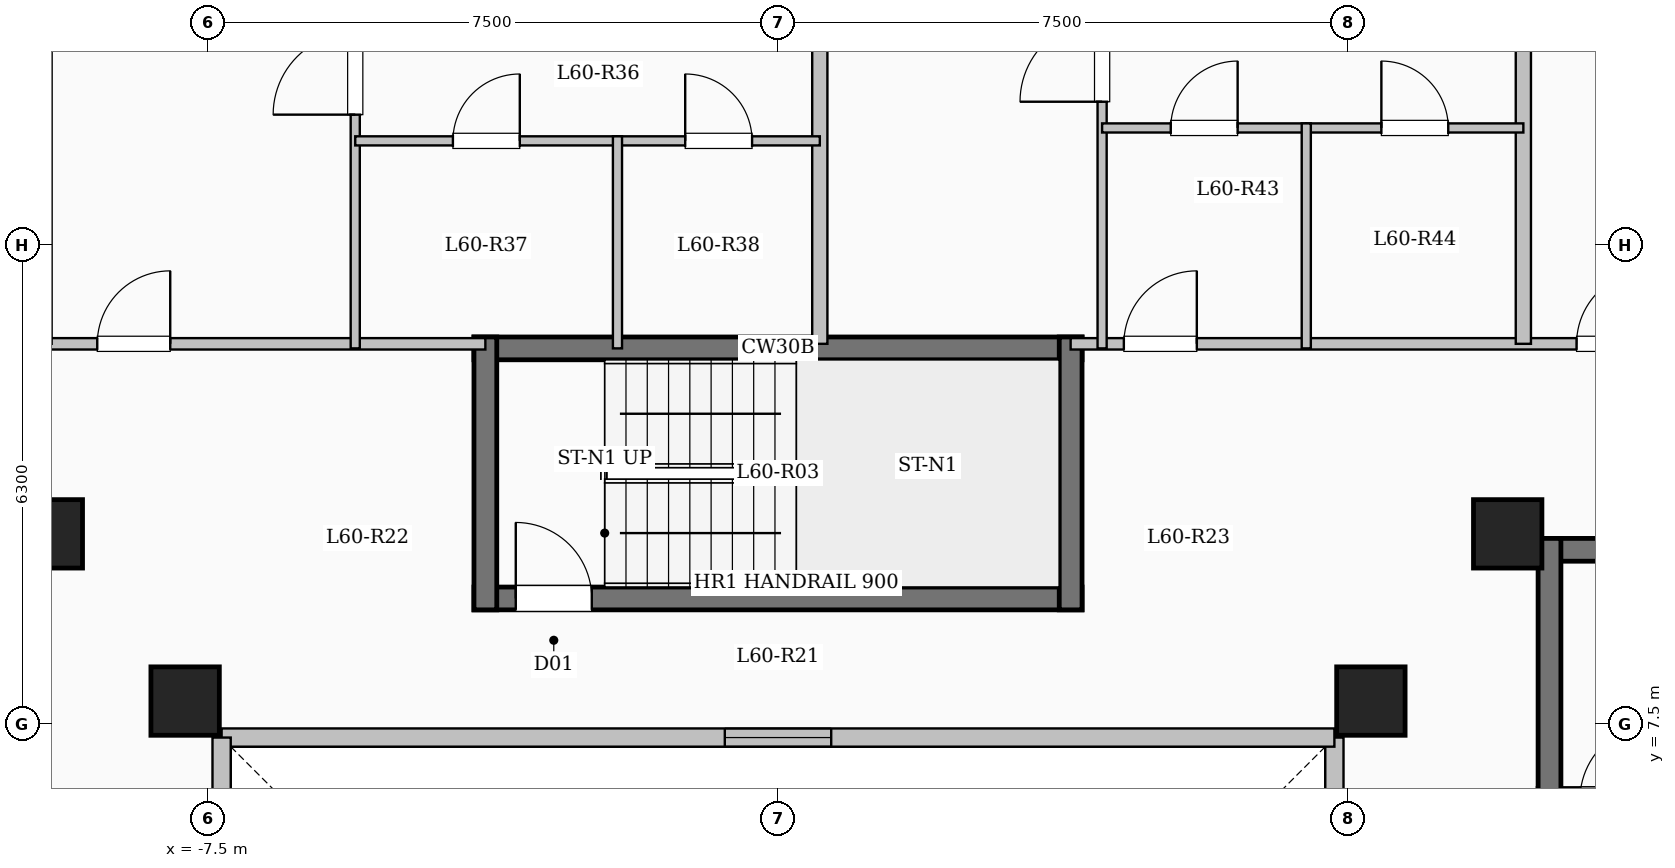
"""IFC4 building model, lengths in metres.
Left out: names, types, materials, properties, quantities, classifications, styles, units other than length and angle.
Written with IfcOpenShell. Run it as: python <this file> out.ifc"""

import sys

from ifc_helpers import new_model, si_unit, direction, frame, frame_2d, origin, origin_2d, place, context, subcontext, project, spatial, rectangle, extrude, element, fill, save


model = new_model("IFC4")
c1 = context("Model", 3, precision=1e-05, world=origin(), true_north=direction((0.0, 1.0)))
c2 = subcontext(c1, "Body", "Model", "MODEL_VIEW")
j1 = project(units=[si_unit("LENGTHUNIT", "METRE"), si_unit("PLANEANGLEUNIT", "RADIAN")], contexts=[c1])
p1 = place(None, origin())
s1 = spatial("IfcSite", under=j1, at=p1, CompositionType="ELEMENT")
p2 = place(p1, origin())
s2 = spatial("IfcBuilding", under=s1, at=p2, CompositionType="ELEMENT")
p3 = place(p2, frame((0.0, 0.0, 220.4)))
s3 = spatial("IfcBuildingStorey", under=s2, at=p3, CompositionType="ELEMENT", Elevation=220.4)
for number, where, z_axis, x_axis in (
    (1, (-7.8, 7.8, 0.0), (0.0, 0.0, 1.0), (1.0, 0.0, 0.0)),
    (2, (7.8, 7.8, 0.0), (0.0, 0.0, 1.0), (1.0, 0.0, 0.0)),
    (3, (-9.6, 10.0, 0.0), (0.0, 0.0, 1.0), (1.0, 0.0, 0.0)),
    (4, (9.6, 10.0, 0.0), (0.0, 0.0, 1.0), (1.0, 0.0, 0.0)),
):
    element("IfcColumn", number, at=place(p3, frame(where, z_axis=z_axis, x_axis=x_axis)), inside=s3, PredefinedType="COLUMN", context=c2, shape_type="SweptSolid", body=[
        extrude(rectangle(XDim=0.9, YDim=0.9, at=origin_2d()), origin(), (0.0, 0.0, 1.0), 3.35),
    ])
p4 = place(p3, frame((7.32, -7.32, 0.0), z_axis=(0.0, 0.0, 1.0), x_axis=(0.0, 1.0, 0.0)))
e5 = element("IfcWall", 5, at=p4, inside=s3, PredefinedType="SOLIDWALL", context=c2, shape_type="SweptSolid", body=[
    extrude(rectangle(XDim=14.64, YDim=0.24, at=frame_2d((7.32, 0.0))), origin(), (0.0, 0.0, 1.0), 3.1),
])
p5 = place(p4, frame((6.62, 0.0, 0.95)))
e6 = element("IfcOpeningElement", 6, at=p5, cuts=e5, PredefinedType="OPENING", context=c2, shape_type="SweptSolid", body=[
    extrude(rectangle(XDim=1.4, YDim=1.5, at=frame_2d((0.7, 0.75))), frame((0.0, 0.13, 0.0), z_axis=(0.0, -1.0, 0.0), x_axis=(1.0, 0.0, 0.0)), (0.0, 0.0, 1.0), 0.26),
])
p6 = place(p3, frame((7.32, 7.32, 0.0), z_axis=(0.0, 0.0, 1.0), x_axis=(-1.0, 0.0, 0.0)))
e7 = element("IfcWall", 7, at=p6, inside=s3, PredefinedType="SOLIDWALL", context=c2, shape_type="SweptSolid", body=[
    extrude(rectangle(XDim=14.64, YDim=0.24, at=frame_2d((7.32, 0.0))), origin(), (0.0, 0.0, 1.0), 3.1),
])
p7 = place(p6, frame((6.62, 0.0, 0.95)))
e8 = element("IfcOpeningElement", 8, at=p7, cuts=e7, PredefinedType="OPENING", context=c2, shape_type="SweptSolid", body=[
    extrude(rectangle(XDim=1.4, YDim=1.5, at=frame_2d((0.7, 0.75))), frame((0.0, 0.13, 0.0), z_axis=(0.0, -1.0, 0.0), x_axis=(1.0, 0.0, 0.0)), (0.0, 0.0, 1.0), 0.26),
])
p8 = place(p3, frame((-7.32, 7.32, 0.0), z_axis=(0.0, 0.0, 1.0), x_axis=(0.0, -1.0, 0.0)))
e9 = element("IfcWall", 9, at=p8, inside=s3, PredefinedType="SOLIDWALL", context=c2, shape_type="SweptSolid", body=[
    extrude(rectangle(XDim=14.64, YDim=0.24, at=frame_2d((7.32, 0.0))), origin(), (0.0, 0.0, 1.0), 3.1),
])
p9 = place(p8, frame((6.62, 0.0, 0.95)))
e10 = element("IfcOpeningElement", 10, at=p9, cuts=e9, PredefinedType="OPENING", context=c2, shape_type="SweptSolid", body=[
    extrude(rectangle(XDim=1.4, YDim=1.5, at=frame_2d((0.7, 0.75))), frame((0.0, 0.13, 0.0), z_axis=(0.0, -1.0, 0.0), x_axis=(1.0, 0.0, 0.0)), (0.0, 0.0, 1.0), 0.26),
])
p10 = place(p3, frame((10.0, 9.79, 0.0), z_axis=(0.0, 0.0, 1.0), x_axis=(1.0, 0.0, 0.0)))
e11 = element("IfcWall", 11, at=p10, inside=s3, PredefinedType="SHEAR", context=c2, shape_type="SweptSolid", body=[
    extrude(rectangle(XDim=8.0, YDim=0.3, at=frame_2d((4.0, 0.0))), origin(), (0.0, 0.0, 1.0), 3.35),
])
p11 = place(p3, frame((10.0, 6.5, 0.0), z_axis=(0.0, 0.0, 1.0), x_axis=(1.0, 0.0, 0.0)))
e12 = element("IfcWall", 12, at=p11, inside=s3, PredefinedType="SHEAR", context=c2, shape_type="SweptSolid", body=[
    extrude(rectangle(XDim=8.0, YDim=0.3, at=frame_2d((4.0, 0.0))), origin(), (0.0, 0.0, 1.0), 3.35),
])
p12 = place(p11, frame((0.55, 0.0, 0.0)))
e13 = element("IfcOpeningElement", 13, at=p12, cuts=e12, PredefinedType="OPENING", context=c2, shape_type="SweptSolid", body=[
    extrude(rectangle(XDim=1.0, YDim=2.15, at=frame_2d((0.5, 1.075))), frame((0.0, 0.16, 0.0), z_axis=(0.0, -1.0, 0.0), x_axis=(1.0, 0.0, 0.0)), (0.0, 0.0, 1.0), 0.32),
])
p13 = place(p3, frame((10.15, 6.35, 0.0), z_axis=(0.0, 0.0, 1.0), x_axis=(0.0, 1.0, 0.0)))
e14 = element("IfcWall", 14, at=p13, inside=s3, PredefinedType="SHEAR", context=c2, shape_type="SweptSolid", body=[
    extrude(rectangle(XDim=3.59, YDim=0.3, at=frame_2d((1.795, 0.0))), origin(), (0.0, 0.0, 1.0), 3.35),
])
p14 = place(p3, frame((-4.0, 12.44, 0.0), z_axis=(0.0, 0.0, 1.0), x_axis=(1.0, 0.0, 0.0)))
e15 = element("IfcWall", 15, at=p14, inside=s3, PredefinedType="SHEAR", context=c2, shape_type="SweptSolid", body=[
    extrude(rectangle(XDim=8.0, YDim=0.3, at=frame_2d((4.0, 0.0))), origin(), (0.0, 0.0, 1.0), 3.35),
])
p15 = place(p3, frame((-4.0, 9.15, 0.0), z_axis=(0.0, 0.0, 1.0), x_axis=(1.0, 0.0, 0.0)))
e16 = element("IfcWall", 16, at=p15, inside=s3, PredefinedType="SHEAR", context=c2, shape_type="SweptSolid", body=[
    extrude(rectangle(XDim=8.0, YDim=0.3, at=frame_2d((4.0, 0.0))), origin(), (0.0, 0.0, 1.0), 3.35),
])
p16 = place(p15, frame((0.55, 0.0, 0.0)))
e17 = element("IfcOpeningElement", 17, at=p16, cuts=e16, PredefinedType="OPENING", context=c2, shape_type="SweptSolid", body=[
    extrude(rectangle(XDim=1.0, YDim=2.15, at=frame_2d((0.5, 1.075))), frame((0.0, 0.16, 0.0), z_axis=(0.0, -1.0, 0.0), x_axis=(1.0, 0.0, 0.0)), (0.0, 0.0, 1.0), 0.32),
])
for number, where, z_axis, x_axis in (
    (18, (-3.85, 9.0, 0.0), (0.0, 0.0, 1.0), (0.0, 1.0, 0.0)),
    (19, (3.85, 9.0, 0.0), (0.0, 0.0, 1.0), (0.0, 1.0, 0.0)),
):
    element("IfcWall", number, at=place(p3, frame(where, z_axis=z_axis, x_axis=x_axis)), inside=s3, PredefinedType="SHEAR", context=c2, shape_type="SweptSolid", body=[
        extrude(rectangle(XDim=3.59, YDim=0.3, at=frame_2d((1.795, 0.0))), origin(), (0.0, 0.0, 1.0), 3.35),
    ])
p17 = place(p3, frame((-18.35, 12.5, 0.0), z_axis=(0.0, 0.0, 1.0), x_axis=(1.0, 0.0, 0.0)))
e20 = element("IfcWall", 20, at=p17, inside=s3, PredefinedType="PARTITIONING", context=c2, shape_type="SweptSolid", body=[
    extrude(rectangle(XDim=14.5, YDim=0.15, at=frame_2d((7.25, 0.0))), origin(), (0.0, 0.0, 1.0), 3.1),
])
p18 = place(p17, frame((0.7, 0.0, 0.0)))
e21 = element("IfcOpeningElement", 21, at=p18, cuts=e20, PredefinedType="OPENING", context=c2, shape_type="SweptSolid", body=[
    extrude(rectangle(XDim=0.96, YDim=2.15, at=frame_2d((0.48, 1.075))), frame((0.0, 0.085, 0.0), z_axis=(0.0, -1.0, 0.0), x_axis=(1.0, 0.0, 0.0)), (0.0, 0.0, 1.0), 0.17),
])
p19 = place(p17, frame((9.394, 0.0, 0.0)))
e22 = element("IfcOpeningElement", 22, at=p19, cuts=e20, PredefinedType="OPENING", context=c2, shape_type="SweptSolid", body=[
    extrude(rectangle(XDim=0.96, YDim=2.15, at=frame_2d((0.48, 1.075))), frame((0.0, 0.085, 0.0), z_axis=(0.0, -1.0, 0.0), x_axis=(1.0, 0.0, 0.0)), (0.0, 0.0, 1.0), 0.17),
])
p20 = place(p3, frame((3.85, 12.5, 0.0), z_axis=(0.0, 0.0, 1.0), x_axis=(1.0, 0.0, 0.0)))
e23 = element("IfcWall", 23, at=p20, inside=s3, PredefinedType="PARTITIONING", context=c2, shape_type="SweptSolid", body=[
    extrude(rectangle(XDim=14.5, YDim=0.15, at=frame_2d((7.25, 0.0))), origin(), (0.0, 0.0, 1.0), 3.1),
])
p21 = place(p20, frame((0.7, 0.0, 0.0)))
e24 = element("IfcOpeningElement", 24, at=p21, cuts=e23, PredefinedType="OPENING", context=c2, shape_type="SweptSolid", body=[
    extrude(rectangle(XDim=0.96, YDim=2.15, at=frame_2d((0.48, 1.075))), frame((0.0, 0.085, 0.0), z_axis=(0.0, -1.0, 0.0), x_axis=(1.0, 0.0, 0.0)), (0.0, 0.0, 1.0), 0.17),
])
p22 = place(p20, frame((6.656, 0.0, 0.0)))
e25 = element("IfcOpeningElement", 25, at=p22, cuts=e23, PredefinedType="OPENING", context=c2, shape_type="SweptSolid", body=[
    extrude(rectangle(XDim=0.96, YDim=2.15, at=frame_2d((0.48, 1.075))), frame((0.0, 0.085, 0.0), z_axis=(0.0, -1.0, 0.0), x_axis=(1.0, 0.0, 0.0)), (0.0, 0.0, 1.0), 0.17),
])
p23 = place(p3, frame((0.55, 12.5, 0.0), z_axis=(0.0, 0.0, 1.0), x_axis=(0.0, 1.0, 0.0)))
e26 = element("IfcWall", 26, at=p23, inside=s3, PredefinedType="SOLIDWALL", context=c2, shape_type="SweptSolid", body=[
    extrude(rectangle(XDim=9.88, YDim=0.2, at=frame_2d((4.94, 0.0))), origin(), (0.0, 0.0, 1.0), 3.1),
])
p24 = place(p3, frame((-5.562, 12.44, 0.0), z_axis=(0.0, 0.0, 1.0), x_axis=(0.0, 1.0, 0.0)))
e27 = element("IfcWall", 27, at=p24, inside=s3, PredefinedType="PARTITIONING", context=c2, shape_type="SweptSolid", body=[
    extrude(rectangle(XDim=9.801, YDim=0.12, at=frame_2d((4.9, 0.0))), origin(), (0.0, 0.0, 1.0), 3.1),
])
p25 = place(p24, frame((3.075, 0.0, 0.0)))
e28 = element("IfcOpeningElement", 28, at=p25, cuts=e27, PredefinedType="OPENING", context=c2, shape_type="SweptSolid", body=[
    extrude(rectangle(XDim=1.08, YDim=2.15, at=frame_2d((0.54, 1.075))), frame((0.0, 0.07, 0.0), z_axis=(0.0, -1.0, 0.0), x_axis=(1.0, 0.0, 0.0)), (0.0, 0.0, 1.0), 0.14),
])
p26 = place(p3, frame((-5.562, 15.17, 0.0), z_axis=(0.0, 0.0, 1.0), x_axis=(1.0, 0.0, 0.0)))
e29 = element("IfcWall", 29, at=p26, inside=s3, PredefinedType="PARTITIONING", context=c2, shape_type="SweptSolid", body=[
    extrude(rectangle(XDim=3.45, YDim=0.12, at=frame_2d((1.725, 0.0))), origin(), (0.0, 0.0, 1.0), 3.1),
])
p27 = place(p26, frame((1.285, 0.0, 0.0)))
e30 = element("IfcOpeningElement", 30, at=p27, cuts=e29, PredefinedType="OPENING", context=c2, shape_type="SweptSolid", body=[
    extrude(rectangle(XDim=0.88, YDim=2.1, at=frame_2d((0.44, 1.05))), frame((0.0, 0.07, 0.0), z_axis=(0.0, -1.0, 0.0), x_axis=(1.0, 0.0, 0.0)), (0.0, 0.0, 1.0), 0.14),
])
p28 = place(p3, frame((-2.112, 15.17, 0.0), z_axis=(0.0, 0.0, 1.0), x_axis=(1.0, 0.0, 0.0)))
e31 = element("IfcWall", 31, at=p28, inside=s3, PredefinedType="PARTITIONING", context=c2, shape_type="SweptSolid", body=[
    extrude(rectangle(XDim=2.662, YDim=0.12, at=frame_2d((1.331, 0.0))), origin(), (0.0, 0.0, 1.0), 3.1),
])
p29 = place(p28, frame((0.891, 0.0, 0.0)))
e32 = element("IfcOpeningElement", 32, at=p29, cuts=e31, PredefinedType="OPENING", context=c2, shape_type="SweptSolid", body=[
    extrude(rectangle(XDim=0.88, YDim=2.1, at=frame_2d((0.44, 1.05))), frame((0.0, 0.07, 0.0), z_axis=(0.0, -1.0, 0.0), x_axis=(1.0, 0.0, 0.0)), (0.0, 0.0, 1.0), 0.14),
])
p30 = place(p3, frame((-2.112, 12.44, 0.0), z_axis=(0.0, 0.0, 1.0), x_axis=(0.0, 1.0, 0.0)))
e33 = element("IfcWall", 33, at=p30, inside=s3, PredefinedType="PARTITIONING", context=c2, shape_type="SweptSolid", body=[
    extrude(rectangle(XDim=2.79, YDim=0.12, at=frame_2d((1.395, 0.0))), origin(), (0.0, 0.0, 1.0), 3.1),
])
p31 = place(p3, frame((9.806, 12.5, 0.0), z_axis=(0.0, 0.0, 1.0), x_axis=(0.0, 1.0, 0.0)))
e34 = element("IfcWall", 34, at=p31, inside=s3, PredefinedType="SOLIDWALL", context=c2, shape_type="SweptSolid", body=[
    extrude(rectangle(XDim=8.695, YDim=0.2, at=frame_2d((4.348, 0.0))), origin(), (0.0, 0.0, 1.0), 3.1),
])
p32 = place(p3, frame((4.264, 12.44, 0.0), z_axis=(0.0, 0.0, 1.0), x_axis=(0.0, 1.0, 0.0)))
e35 = element("IfcWall", 35, at=p32, inside=s3, PredefinedType="PARTITIONING", context=c2, shape_type="SweptSolid", body=[
    extrude(rectangle(XDim=9.94, YDim=0.12, at=frame_2d((4.97, 0.0))), origin(), (0.0, 0.0, 1.0), 3.1),
])
p33 = place(p32, frame((3.245, 0.0, 0.0)))
e36 = element("IfcOpeningElement", 36, at=p33, cuts=e35, PredefinedType="OPENING", context=c2, shape_type="SweptSolid", body=[
    extrude(rectangle(XDim=1.08, YDim=2.15, at=frame_2d((0.54, 1.075))), frame((0.0, 0.07, 0.0), z_axis=(0.0, -1.0, 0.0), x_axis=(1.0, 0.0, 0.0)), (0.0, 0.0, 1.0), 0.14),
])
p34 = place(p3, frame((4.264, 15.34, 0.0), z_axis=(0.0, 0.0, 1.0), x_axis=(1.0, 0.0, 0.0)))
e37 = element("IfcWall", 37, at=p34, inside=s3, PredefinedType="PARTITIONING", context=c2, shape_type="SweptSolid", body=[
    extrude(rectangle(XDim=2.686, YDim=0.12, at=frame_2d((1.343, 0.0))), origin(), (0.0, 0.0, 1.0), 2.725),
])
p35 = place(p34, frame((0.903, 0.0, 0.0)))
e38 = element("IfcOpeningElement", 38, at=p35, cuts=e37, PredefinedType="OPENING", context=c2, shape_type="SweptSolid", body=[
    extrude(rectangle(XDim=0.88, YDim=2.1, at=frame_2d((0.44, 1.05))), frame((0.0, 0.07, 0.0), z_axis=(0.0, -1.0, 0.0), x_axis=(1.0, 0.0, 0.0)), (0.0, 0.0, 1.0), 0.14),
])
p36 = place(p3, frame((6.95, 15.34, 0.0), z_axis=(0.0, 0.0, 1.0), x_axis=(1.0, 0.0, 0.0)))
e39 = element("IfcWall", 39, at=p36, inside=s3, PredefinedType="PARTITIONING", context=c2, shape_type="SweptSolid", body=[
    extrude(rectangle(XDim=2.856, YDim=0.12, at=frame_2d((1.428, 0.0))), origin(), (0.0, 0.0, 1.0), 2.725),
])
p37 = place(p36, frame((0.988, 0.0, 0.0)))
e40 = element("IfcOpeningElement", 40, at=p37, cuts=e39, PredefinedType="OPENING", context=c2, shape_type="SweptSolid", body=[
    extrude(rectangle(XDim=0.88, YDim=2.1, at=frame_2d((0.44, 1.05))), frame((0.0, 0.07, 0.0), z_axis=(0.0, -1.0, 0.0), x_axis=(1.0, 0.0, 0.0)), (0.0, 0.0, 1.0), 0.14),
])
p38 = place(p3, frame((6.95, 12.44, 0.0), z_axis=(0.0, 0.0, 1.0), x_axis=(0.0, 1.0, 0.0)))
e41 = element("IfcWall", 41, at=p38, inside=s3, PredefinedType="PARTITIONING", context=c2, shape_type="SweptSolid", body=[
    extrude(rectangle(XDim=2.96, YDim=0.12, at=frame_2d((1.48, 0.0))), origin(), (0.0, 0.0, 1.0), 3.1),
])
p39 = place(p7, origin())
e42 = element("IfcWindow", 42, at=p39, inside=s3, PartitioningType="SINGLE_PANEL", PredefinedType="WINDOW", context=c2, shape_type="SweptSolid", body=[
    extrude(rectangle(XDim=1.4, YDim=1.5, at=frame_2d((0.7, 0.75))), frame((0.0, 0.03, 0.0), z_axis=(0.0, -1.0, 0.0), x_axis=(1.0, 0.0, 0.0)), (0.0, 0.0, 1.0), 0.06),
])
fill(e8, e42)
p40 = place(p16, origin())
e43 = element("IfcDoor", 43, at=p40, inside=s3, OperationType="SINGLE_SWING_LEFT", PredefinedType="DOOR", context=c2, shape_type="SweptSolid", body=[
    extrude(rectangle(XDim=1.0, YDim=2.15, at=frame_2d((0.5, 1.075))), frame((0.0, 0.025, 0.0), z_axis=(0.0, -1.0, 0.0), x_axis=(1.0, 0.0, 0.0)), (0.0, 0.0, 1.0), 0.05),
])
fill(e17, e43)
p41 = place(p19, origin())
e44 = element("IfcDoor", 44, at=p41, inside=s3, OperationType="SINGLE_SWING_RIGHT", PredefinedType="DOOR", context=c2, shape_type="SweptSolid", body=[
    extrude(rectangle(XDim=0.96, YDim=2.15, at=frame_2d((0.48, 1.075))), frame((0.0, 0.025, 0.0), z_axis=(0.0, -1.0, 0.0), x_axis=(1.0, 0.0, 0.0)), (0.0, 0.0, 1.0), 0.05),
])
fill(e22, e44)
p42 = place(p25, origin())
e45 = element("IfcDoor", 45, at=p42, inside=s3, OperationType="SINGLE_SWING_LEFT", PredefinedType="DOOR", context=c2, shape_type="SweptSolid", body=[
    extrude(rectangle(XDim=1.08, YDim=2.15, at=frame_2d((0.54, 1.075))), frame((0.0, 0.025, 0.0), z_axis=(0.0, -1.0, 0.0), x_axis=(1.0, 0.0, 0.0)), (0.0, 0.0, 1.0), 0.05),
])
fill(e28, e45)
p43 = place(p27, origin())
e46 = element("IfcDoor", 46, at=p43, inside=s3, OperationType="SINGLE_SWING_RIGHT", PredefinedType="DOOR", context=c2, shape_type="SweptSolid", body=[
    extrude(rectangle(XDim=0.88, YDim=2.1, at=frame_2d((0.44, 1.05))), frame((0.0, 0.025, 0.0), z_axis=(0.0, -1.0, 0.0), x_axis=(1.0, 0.0, 0.0)), (0.0, 0.0, 1.0), 0.05),
])
fill(e30, e46)
p44 = place(p29, origin())
e47 = element("IfcDoor", 47, at=p44, inside=s3, OperationType="SINGLE_SWING_LEFT", PredefinedType="DOOR", context=c2, shape_type="SweptSolid", body=[
    extrude(rectangle(XDim=0.88, YDim=2.1, at=frame_2d((0.44, 1.05))), frame((0.0, 0.025, 0.0), z_axis=(0.0, -1.0, 0.0), x_axis=(1.0, 0.0, 0.0)), (0.0, 0.0, 1.0), 0.05),
])
fill(e32, e47)
p45 = place(p21, origin())
e48 = element("IfcDoor", 48, at=p45, inside=s3, OperationType="SINGLE_SWING_RIGHT", PredefinedType="DOOR", context=c2, shape_type="SweptSolid", body=[
    extrude(rectangle(XDim=0.96, YDim=2.15, at=frame_2d((0.48, 1.075))), frame((0.0, 0.025, 0.0), z_axis=(0.0, -1.0, 0.0), x_axis=(1.0, 0.0, 0.0)), (0.0, 0.0, 1.0), 0.05),
])
fill(e24, e48)
p46 = place(p33, origin())
e49 = element("IfcDoor", 49, at=p46, inside=s3, OperationType="SINGLE_SWING_LEFT", PredefinedType="DOOR", context=c2, shape_type="SweptSolid", body=[
    extrude(rectangle(XDim=1.08, YDim=2.15, at=frame_2d((0.54, 1.075))), frame((0.0, 0.025, 0.0), z_axis=(0.0, -1.0, 0.0), x_axis=(1.0, 0.0, 0.0)), (0.0, 0.0, 1.0), 0.05),
])
fill(e36, e49)
p47 = place(p35, origin())
e50 = element("IfcDoor", 50, at=p47, inside=s3, OperationType="SINGLE_SWING_RIGHT", PredefinedType="DOOR", context=c2, shape_type="SweptSolid", body=[
    extrude(rectangle(XDim=0.88, YDim=2.1, at=frame_2d((0.44, 1.05))), frame((0.0, 0.025, 0.0), z_axis=(0.0, -1.0, 0.0), x_axis=(1.0, 0.0, 0.0)), (0.0, 0.0, 1.0), 0.05),
])
fill(e38, e50)
p48 = place(p37, origin())
e51 = element("IfcDoor", 51, at=p48, inside=s3, OperationType="SINGLE_SWING_LEFT", PredefinedType="DOOR", context=c2, shape_type="SweptSolid", body=[
    extrude(rectangle(XDim=0.88, YDim=2.1, at=frame_2d((0.44, 1.05))), frame((0.0, 0.025, 0.0), z_axis=(0.0, -1.0, 0.0), x_axis=(1.0, 0.0, 0.0)), (0.0, 0.0, 1.0), 0.05),
])
fill(e40, e51)
p49 = place(p22, origin())
e52 = element("IfcDoor", 52, at=p49, inside=s3, OperationType="SINGLE_SWING_RIGHT", PredefinedType="DOOR", context=c2, shape_type="SweptSolid", body=[
    extrude(rectangle(XDim=0.96, YDim=2.15, at=frame_2d((0.48, 1.075))), frame((0.0, 0.025, 0.0), z_axis=(0.0, -1.0, 0.0), x_axis=(1.0, 0.0, 0.0)), (0.0, 0.0, 1.0), 0.05),
])
fill(e25, e52)
save(model, sys.argv[1])
